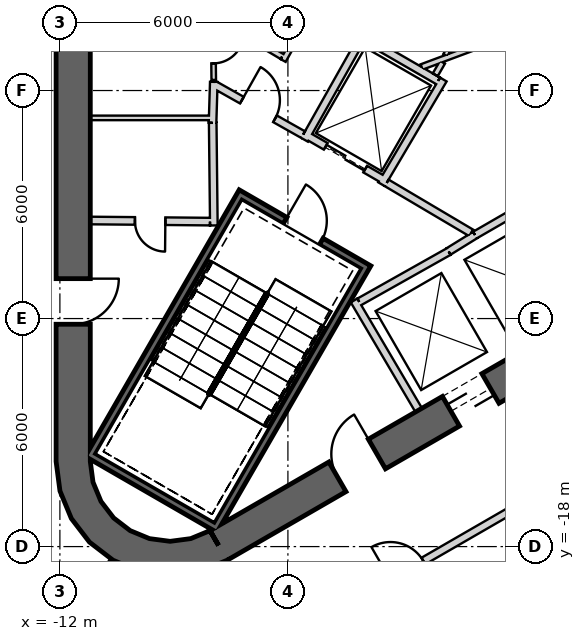
"""IFC4 building model, lengths in metres.
Left out: names, types, materials, properties, quantities, classifications, styles, units other than length and angle.
Written with IfcOpenShell. Run it as: python <this file> out.ifc"""

import sys

from ifc_helpers import new_model, si_unit, direction, frame, frame_2d, origin, place, context, subcontext, project, spatial, polyline, rectangle, outline, extrude, element, fill, save


model = new_model("IFC4")
c1 = context("Model", 3, precision=1e-05, world=origin(), true_north=direction((0.0, 1.0)))
c2 = subcontext(c1, "Body", "Model", "MODEL_VIEW")
j1 = project(units=[si_unit("LENGTHUNIT", "METRE"), si_unit("PLANEANGLEUNIT", "RADIAN")], contexts=[c1])
p1 = place(None, origin())
s1 = spatial("IfcSite", under=j1, at=p1, CompositionType="ELEMENT")
p2 = place(p1, origin())
s2 = spatial("IfcBuilding", under=s1, at=p2, CompositionType="ELEMENT")
p3 = place(p2, frame((0.0, 0.0, 404.8)))
s3 = spatial("IfcBuildingStorey", under=s2, at=p3, CompositionType="ELEMENT", Elevation=404.8)
p4 = place(p3, frame((-11.65, 15.762, 0.0), z_axis=(0.0, 0.0, 1.0), x_axis=(0.0, -1.0, 0.0)))
e1 = element("IfcWall", 1, at=p4, inside=s3, PredefinedType="SHEAR", context=c2, shape_type="SweptSolid", body=[
    extrude(rectangle(XDim=31.523, YDim=0.9, at=frame_2d((15.762, 0.0))), origin(), (0.0, 0.0, 1.0), 5.5),
])
p5 = place(p4, frame((3.612, 0.0, 0.0)))
e2 = element("IfcOpeningElement", 2, at=p5, cuts=e1, PredefinedType="OPENING", context=c2, shape_type="SweptSolid", body=[
    extrude(rectangle(XDim=1.2, YDim=2.4, at=frame_2d((0.6, 1.2))), frame((0.0, 0.46, 0.0), z_axis=(0.0, -1.0, 0.0), x_axis=(1.0, 0.0, 0.0)), (0.0, 0.0, 1.0), 0.92),
])
p6 = place(p4, frame((26.712, 0.0, 0.0)))
e3 = element("IfcOpeningElement", 3, at=p6, cuts=e1, PredefinedType="OPENING", context=c2, shape_type="SweptSolid", body=[
    extrude(rectangle(XDim=1.2, YDim=2.4, at=frame_2d((0.6, 1.2))), frame((0.0, 0.46, 0.0), z_axis=(0.0, -1.0, 0.0), x_axis=(1.0, 0.0, 0.0)), (0.0, 0.0, 1.0), 0.92),
])
p7 = place(p3, frame((-7.825, -17.97, 0.0), z_axis=(0.0, 0.0, 1.0), x_axis=(0.866028369851, 0.499994862586, 0.0)))
e4 = element("IfcWall", 4, at=p7, inside=s3, PredefinedType="SHEAR", context=c2, shape_type="SweptSolid", body=[
    extrude(rectangle(XDim=31.523, YDim=0.9, at=frame_2d((15.762, 0.0))), origin(), (0.0, 0.0, 1.0), 5.5),
])
p8 = place(p7, frame((7.062, 0.0, 0.0)))
e5 = element("IfcOpeningElement", 5, at=p8, cuts=e4, PredefinedType="OPENING", context=c2, shape_type="SweptSolid", body=[
    extrude(rectangle(XDim=1.2, YDim=2.4, at=frame_2d((0.6, 1.2))), frame((0.0, 0.46, 0.0), z_axis=(0.0, -1.0, 0.0), x_axis=(1.0, 0.0, 0.0)), (0.0, 0.0, 1.0), 0.92),
])
p9 = place(p7, frame((9.762, 0.0, 0.0)))
e6 = element("IfcOpeningElement", 6, at=p9, cuts=e4, PredefinedType="OPENING", context=c2, shape_type="SweptSolid", body=[
    extrude(rectangle(XDim=1.2, YDim=2.4, at=frame_2d((0.6, 1.2))), frame((0.0, 0.46, 0.0), z_axis=(0.0, -1.0, 0.0), x_axis=(1.0, 0.0, 0.0)), (0.0, 0.0, 1.0), 0.92),
])
p10 = place(p7, frame((17.862, 0.0, 0.0)))
e7 = element("IfcOpeningElement", 7, at=p10, cuts=e4, PredefinedType="OPENING", context=c2, shape_type="SweptSolid", body=[
    extrude(rectangle(XDim=1.2, YDim=2.4, at=frame_2d((0.6, 1.2))), frame((0.0, 0.46, 0.0), z_axis=(0.0, -1.0, 0.0), x_axis=(1.0, 0.0, 0.0)), (0.0, 0.0, 1.0), 0.92),
])
p11 = place(p7, frame((20.562, 0.0, 0.0)))
e8 = element("IfcOpeningElement", 8, at=p11, cuts=e4, PredefinedType="OPENING", context=c2, shape_type="SweptSolid", body=[
    extrude(rectangle(XDim=1.2, YDim=2.4, at=frame_2d((0.6, 1.2))), frame((0.0, 0.46, 0.0), z_axis=(0.0, -1.0, 0.0), x_axis=(1.0, 0.0, 0.0)), (0.0, 0.0, 1.0), 0.92),
])
p12 = place(p7, frame((26.712, 0.0, 0.0)))
e9 = element("IfcOpeningElement", 9, at=p12, cuts=e4, PredefinedType="OPENING", context=c2, shape_type="SweptSolid", body=[
    extrude(rectangle(XDim=1.2, YDim=2.4, at=frame_2d((0.6, 1.2))), frame((0.0, 0.46, 0.0), z_axis=(0.0, -1.0, 0.0), x_axis=(1.0, 0.0, 0.0)), (0.0, 0.0, 1.0), 0.92),
])
p13 = place(p7, frame((3.612, 0.0, 0.0)))
e10 = element("IfcOpeningElement", 10, at=p13, cuts=e4, PredefinedType="OPENING", context=c2, shape_type="SweptSolid", body=[
    extrude(rectangle(XDim=1.2, YDim=2.4, at=frame_2d((0.6, 1.2))), frame((0.0, 0.46, 0.0), z_axis=(0.0, -1.0, 0.0), x_axis=(1.0, 0.0, 0.0)), (0.0, 0.0, 1.0), 0.92),
])
p14 = place(p3, origin())
e11 = element("IfcWall", 11, at=p14, inside=s3, PredefinedType="SHEAR", context=c2, shape_type="SweptSolid", body=[
    extrude(outline(polyline([(-12.1, -15.762), (-11.998, -16.538), (-11.698, -17.262), (-11.221, -17.883), (-10.6, -18.36), (-9.876, -18.659), (-9.1, -18.762), (-8.323, -18.659), (-7.6, -18.36), (-8.05, -17.58), (-8.556, -17.79), (-9.1, -17.862), (-9.644, -17.79), (-10.15, -17.58), (-10.585, -17.247), (-10.919, -16.812), (-11.128, -16.305), (-11.2, -15.762), (-12.1, -15.762)])), origin(), (0.0, 0.0, 1.0), 5.5),
])
p15 = place(p3, frame((-2.558, -14.409, 0.0), z_axis=(0.0, 0.0, 1.0), x_axis=(-0.507997497166, 0.861358544901, 0.0)))
e12 = element("IfcWall", 12, at=p15, inside=s3, PredefinedType="PLUMBINGWALL", context=c2, shape_type="SweptSolid", body=[
    extrude(rectangle(XDim=3.35, YDim=0.2, at=frame_2d((1.675, 0.0))), origin(), (0.0, 0.0, 1.0), 5.25),
])
p16 = place(p3, frame((-1.769, -10.237, 0.0), z_axis=(0.0, 0.0, 1.0), x_axis=(-0.871534483978, -0.490334215854, 0.0)))
e13 = element("IfcWall", 13, at=p16, inside=s3, PredefinedType="PLUMBINGWALL", context=c2, shape_type="SweptSolid", body=[
    extrude(rectangle(XDim=2.7, YDim=0.2, at=frame_2d((1.35, 0.0))), origin(), (0.0, 0.0, 1.0), 5.25),
])
p17 = place(p3, frame((-1.076, -9.803, 0.0), z_axis=(0.0, 0.0, 1.0), x_axis=(-0.850341601995, -0.526231089842, 0.0)))
e14 = element("IfcWall", 14, at=p17, inside=s3, PredefinedType="PLUMBINGWALL", context=c2, shape_type="SweptSolid", body=[
    extrude(rectangle(XDim=0.817, YDim=0.2, at=frame_2d((0.408, 0.0))), origin(), (0.0, 0.0, 1.0), 5.25),
])
p18 = place(p3, frame((-1.077, -9.802, 0.0), z_axis=(0.0, 0.0, 1.0), x_axis=(0.865993522811, 0.500055215401, 0.0)))
e15 = element("IfcWall", 15, at=p18, inside=s3, PredefinedType="PLUMBINGWALL", context=c2, shape_type="SweptSolid", body=[
    extrude(rectangle(XDim=1.884, YDim=0.2, at=frame_2d((0.942, 0.0))), origin(), (0.0, 0.0, 1.0), 5.25),
])
p19 = place(p3, frame((-3.905, -10.563, -0.3), z_axis=(0.0, 0.0, 1.0), x_axis=(-0.500012932018, -0.866017937352, 0.0)))
e16 = element("IfcWall", 16, at=p19, inside=s3, PredefinedType="SHEAR", context=c2, shape_type="SweptSolid", body=[
    extrude(rectangle(XDim=8.1, YDim=0.2, at=frame_2d((4.05, 0.0))), origin(), (0.0, 0.0, 1.0), 5.55),
])
p20 = place(p3, frame((-11.282, -15.541, -0.3), z_axis=(0.0, 0.0, 1.0), x_axis=(0.866000483506, -0.500043160704, 0.0)))
e17 = element("IfcWall", 17, at=p20, inside=s3, PredefinedType="SHEAR", context=c2, shape_type="SweptSolid", body=[
    extrude(rectangle(XDim=3.8, YDim=0.2, at=frame_2d((1.9, 0.0))), origin(), (0.0, 0.0, 1.0), 5.55),
])
p21 = place(p3, frame((-7.196, -8.663, -0.3), z_axis=(0.0, 0.0, 1.0), x_axis=(-0.499997992926, -0.866026562566, 0.0)))
e18 = element("IfcWall", 18, at=p21, inside=s3, PredefinedType="SHEAR", context=c2, shape_type="SweptSolid", body=[
    extrude(rectangle(XDim=7.9, YDim=0.2, at=frame_2d((3.95, 0.0))), origin(), (0.0, 0.0, 1.0), 5.55),
])
p22 = place(p3, frame((-4.041, -10.599, -0.3), z_axis=(0.0, 0.0, 1.0), x_axis=(-0.866047807691, 0.499961193289, 0.0)))
e19 = element("IfcWall", 19, at=p22, inside=s3, PredefinedType="SHEAR", context=c2, shape_type="SweptSolid", body=[
    extrude(rectangle(XDim=3.6, YDim=0.2, at=frame_2d((1.8, 0.0))), origin(), (0.0, 0.0, 1.0), 5.55),
])
p23 = place(p22, frame((1.25, 0.0, 0.3)))
e20 = element("IfcOpeningElement", 20, at=p23, cuts=e19, PredefinedType="OPENING", context=c2, shape_type="SweptSolid", body=[
    extrude(rectangle(XDim=1.1, YDim=2.1, at=frame_2d((0.55, 1.05))), frame((0.0, 0.11, 0.0), z_axis=(0.0, -1.0, 0.0), x_axis=(1.0, 0.0, 0.0)), (0.0, 0.0, 1.0), 0.22),
])
p24 = place(p3, frame((-3.446, -8.368, 0.0), z_axis=(0.0, 0.0, 1.0), x_axis=(-0.866024647952, 0.500001309137, 0.0)))
e21 = element("IfcWall", 21, at=p24, inside=s3, PredefinedType="PLUMBINGWALL", context=c2, shape_type="SweptSolid", body=[
    extrude(rectangle(XDim=2.4, YDim=0.2, at=frame_2d((1.2, 0.0))), origin(), (0.0, 0.0, 1.0), 5.25),
])
p25 = place(p24, frame((0.6, 0.0, 0.0)))
e22 = element("IfcOpeningElement", 22, at=p25, cuts=e21, PredefinedType="OPENING", context=c2, shape_type="SweptSolid", body=[
    extrude(rectangle(XDim=1.2, YDim=2.4, at=frame_2d((0.6, 1.2))), frame((0.0, 0.11, 0.0), z_axis=(0.0, -1.0, 0.0), x_axis=(1.0, 0.0, 0.0)), (0.0, 0.0, 1.0), 0.22),
])
p26 = place(p3, frame((-3.953, -4.646, 0.0), z_axis=(0.0, 0.0, 1.0), x_axis=(0.86605622881, -0.499946605688, 0.0)))
e23 = element("IfcWall", 23, at=p26, inside=s3, PredefinedType="PLUMBINGWALL", context=c2, shape_type="SweptSolid", body=[
    extrude(rectangle(XDim=2.2, YDim=0.2, at=frame_2d((1.1, 0.0))), origin(), (0.0, 0.0, 1.0), 5.25),
])
p27 = place(p3, frame((-1.91, -5.71, 0.0), z_axis=(0.0, 0.0, 1.0), x_axis=(-0.508616218331, -0.860993346345, 0.0)))
e24 = element("IfcWall", 24, at=p27, inside=s3, PredefinedType="PLUMBINGWALL", context=c2, shape_type="SweptSolid", body=[
    extrude(rectangle(XDim=3.2, YDim=0.2, at=frame_2d((1.6, 0.0))), origin(), (0.0, 0.0, 1.0), 5.25),
])
p28 = place(p3, frame((-3.99, -4.509, 0.0), z_axis=(0.0, 0.0, 1.0), x_axis=(-0.491358283181, -0.870957540612, 0.0)))
e25 = element("IfcWall", 25, at=p28, inside=s3, PredefinedType="PLUMBINGWALL", context=c2, shape_type="SweptSolid", body=[
    extrude(rectangle(XDim=3.2, YDim=0.2, at=frame_2d((1.6, 0.0))), origin(), (0.0, 0.0, 1.0), 5.25),
])
p29 = place(p3, frame((-11.2, -6.72, 0.0), z_axis=(0.0, 0.0, 1.0), x_axis=(1.0, 0.0, 0.0)))
e26 = element("IfcWall", 26, at=p29, inside=s3, PredefinedType="PARTITIONING", context=c2, shape_type="SweptSolid", body=[
    extrude(rectangle(XDim=3.25, YDim=0.12, at=frame_2d((1.625, 0.0))), origin(), (0.0, 0.0, 1.0), 5.25),
])
p30 = place(p3, frame((-7.983, -6.85, 0.0), z_axis=(0.0, 0.0, 1.0), x_axis=(0.030803413295, 0.999525462272, 0.0)))
e27 = element("IfcWall", 27, at=p30, inside=s3, PredefinedType="PARTITIONING", context=c2, shape_type="SweptSolid", body=[
    extrude(rectangle(XDim=1.078, YDim=0.2, at=frame_2d((0.539, 0.0))), origin(), (0.0, 0.0, 1.0), 5.25),
])
p31 = place(p3, frame((-7.951, -5.721, 0.0), z_axis=(0.0, 0.0, 1.0), x_axis=(-0.011976938133, 0.999928273904, 0.0)))
e28 = element("IfcWall", 28, at=p31, inside=s3, PredefinedType="PARTITIONING", context=c2, shape_type="SweptSolid", body=[
    extrude(rectangle(XDim=1.671, YDim=0.12, at=frame_2d((0.836, 0.0))), origin(), (0.0, 0.0, 1.0), 5.25),
])
p32 = place(p31, frame((0.436, 0.0, 0.0)))
e29 = element("IfcOpeningElement", 29, at=p32, cuts=e28, PredefinedType="OPENING", context=c2, shape_type="SweptSolid", body=[
    extrude(rectangle(XDim=0.8, YDim=2.1, at=frame_2d((0.4, 1.05))), frame((0.0, 0.07, 0.0), z_axis=(0.0, -1.0, 0.0), x_axis=(1.0, 0.0, 0.0)), (0.0, 0.0, 1.0), 0.14),
])
p33 = place(p3, frame((-7.949, -9.55, 0.0), z_axis=(0.0, 0.0, 1.0), x_axis=(-0.011121475088, 0.999938154483, 0.0)))
e30 = element("IfcWall", 30, at=p33, inside=s3, PredefinedType="PARTITIONING", context=c2, shape_type="SweptSolid", body=[
    extrude(rectangle(XDim=2.7, YDim=0.2, at=frame_2d((1.35, 0.0))), origin(), (0.0, 0.0, 1.0), 5.25),
])
p34 = place(p3, frame((-11.2, -9.42, 0.0), z_axis=(0.0, 0.0, 1.0), x_axis=(0.999957467379, -0.009222983926, 0.0)))
e31 = element("IfcWall", 31, at=p34, inside=s3, PredefinedType="PARTITIONING", context=c2, shape_type="SweptSolid", body=[
    extrude(rectangle(XDim=3.15, YDim=0.2, at=frame_2d((1.575, 0.0))), origin(), (0.0, 0.0, 1.0), 5.25),
])
p35 = place(p34, frame((1.175, 0.0, 0.0)))
e32 = element("IfcOpeningElement", 32, at=p35, cuts=e31, PredefinedType="OPENING", context=c2, shape_type="SweptSolid", body=[
    extrude(rectangle(XDim=0.8, YDim=2.1, at=frame_2d((0.4, 1.05))), frame((0.0, 0.11, 0.0), z_axis=(0.0, -1.0, 0.0), x_axis=(1.0, 0.0, 0.0)), (0.0, 0.0, 1.0), 0.22),
])
p36 = place(p3, frame((-3.401, -8.43, 0.0), z_axis=(0.0, 0.0, 1.0), x_axis=(0.860630814782, -0.509229418482, 0.0)))
e33 = element("IfcWall", 33, at=p36, inside=s3, PredefinedType="PARTITIONING", context=c2, shape_type="SweptSolid", body=[
    extrude(rectangle(XDim=2.582, YDim=0.2, at=frame_2d((1.291, 0.0))), origin(), (0.0, 0.0, 1.0), 5.25),
])
p37 = place(p3, frame((-7.96, -5.831, 0.0), z_axis=(0.0, 0.0, 1.0), x_axis=(0.871327438366, -0.490702043148, 0.0)))
e34 = element("IfcWall", 34, at=p37, inside=s3, PredefinedType="PARTITIONING", context=c2, shape_type="SweptSolid", body=[
    extrude(rectangle(XDim=2.708, YDim=0.2, at=frame_2d((1.354, 0.0))), origin(), (0.0, 0.0, 1.0), 5.25),
])
p38 = place(p37, frame((0.86, 0.0, 0.0)))
e35 = element("IfcOpeningElement", 35, at=p38, cuts=e34, PredefinedType="OPENING", context=c2, shape_type="SweptSolid", body=[
    extrude(rectangle(XDim=1.0, YDim=2.1, at=frame_2d((0.5, 1.05))), frame((0.0, 0.11, 0.0), z_axis=(0.0, -1.0, 0.0), x_axis=(1.0, 0.0, 0.0)), (0.0, 0.0, 1.0), 0.22),
])
p39 = place(p3, frame((4.807, -2.659, 0.0), z_axis=(0.0, 0.0, 1.0), x_axis=(-0.936818342118, -0.349816228714, 0.0)))
e36 = element("IfcWall", 36, at=p39, inside=s3, PredefinedType="PLUMBINGWALL", context=c2, shape_type="SweptSolid", body=[
    extrude(rectangle(XDim=7.78, YDim=0.15, at=frame_2d((3.89, 0.0))), origin(), (0.0, 0.0, 1.0), 5.25),
])
p40 = place(p3, frame((0.182, -1.535, 0.0), z_axis=(0.0, 0.0, 1.0), x_axis=(-0.499988401207, -0.866032100247, 0.0)))
e37 = element("IfcWall", 37, at=p40, inside=s3, PredefinedType="PARTITIONING", context=c2, shape_type="SweptSolid", body=[
    extrude(rectangle(XDim=4.079, YDim=0.12, at=frame_2d((2.04, 0.0))), origin(), (0.0, 0.0, 1.0), 5.25),
])
p41 = place(p40, frame((1.691, 0.0, 0.0)))
e38 = element("IfcOpeningElement", 38, at=p41, cuts=e37, PredefinedType="OPENING", context=c2, shape_type="SweptSolid", body=[
    extrude(rectangle(XDim=0.8, YDim=2.1, at=frame_2d((0.4, 1.05))), frame((0.0, 0.07, 0.0), z_axis=(0.0, -1.0, 0.0), x_axis=(1.0, 0.0, 0.0)), (0.0, 0.0, 1.0), 0.14),
])
p42 = place(p3, frame((-1.932, -5.256, 0.0), z_axis=(0.0, 0.0, 1.0), x_axis=(-0.499777709171, -0.866153705422, 0.0)))
e39 = element("IfcWall", 39, at=p42, inside=s3, PredefinedType="PLUMBINGWALL", context=c2, shape_type="SweptSolid", body=[
    extrude(rectangle(XDim=0.383, YDim=0.15, at=frame_2d((0.191, 0.0))), origin(), (0.0, 0.0, 1.0), 5.25),
])
p43 = place(p3, frame((-6.125, -5.211, 0.0), z_axis=(0.0, 0.0, 1.0), x_axis=(0.488762436737, 0.87241691893, 0.0)))
e40 = element("IfcWall", 40, at=p43, inside=s3, PredefinedType="PLUMBINGWALL", context=c2, shape_type="SweptSolid", body=[
    extrude(rectangle(XDim=2.337, YDim=0.15, at=frame_2d((1.168, 0.0))), origin(), (0.0, 0.0, 1.0), 5.25),
])
p44 = place(p43, frame((0.806, 0.0, 0.0)))
e41 = element("IfcOpeningElement", 41, at=p44, cuts=e40, PredefinedType="OPENING", context=c2, shape_type="SweptSolid", body=[
    extrude(rectangle(XDim=0.8, YDim=2.1, at=frame_2d((0.4, 1.05))), frame((0.0, 0.085, 0.0), z_axis=(0.0, -1.0, 0.0), x_axis=(1.0, 0.0, 0.0)), (0.0, 0.0, 1.0), 0.17),
])
p45 = place(p3, frame((-7.95, -4.041, 0.0), z_axis=(0.0, 0.0, 1.0), x_axis=(0.860090281069, -0.510141851263, 0.0)))
e42 = element("IfcWall", 42, at=p45, inside=s3, PredefinedType="PLUMBINGWALL", context=c2, shape_type="SweptSolid", body=[
    extrude(rectangle(XDim=2.089, YDim=0.15, at=frame_2d((1.045, 0.0))), origin(), (0.0, 0.0, 1.0), 5.25),
])
p46 = place(p3, frame((-10.549, -18.212, 0.0), z_axis=(0.0, 0.0, 1.0), x_axis=(-0.500047596559, -0.865997922154, 0.0)))
e43 = element("IfcWall", 43, at=p46, inside=s3, PredefinedType="PARTITIONING", context=c2, shape_type="SweptSolid", body=[
    extrude(rectangle(XDim=2.6, YDim=0.12, at=frame_2d((1.3, 0.0))), origin(), (0.0, 0.0, 1.0), 3.02),
])
p47 = place(p3, frame((-6.852, -20.93, 0.0), z_axis=(0.0, 0.0, 1.0), x_axis=(0.866016739626, 0.500015006463, 0.0)))
e44 = element("IfcWall", 44, at=p47, inside=s3, PredefinedType="PARTITIONING", context=c2, shape_type="SweptSolid", body=[
    extrude(rectangle(XDim=9.078, YDim=0.2, at=frame_2d((4.539, 0.0))), origin(), (0.0, 0.0, 1.0), 5.25),
])
p48 = place(p47, frame((4.1, 0.0, 0.0)))
e45 = element("IfcOpeningElement", 45, at=p48, cuts=e44, PredefinedType="OPENING", context=c2, shape_type="SweptSolid", body=[
    extrude(rectangle(XDim=1.0, YDim=2.1, at=frame_2d((0.5, 1.05))), frame((0.0, 0.11, 0.0), z_axis=(0.0, -1.0, 0.0), x_axis=(1.0, 0.0, 0.0)), (0.0, 0.0, 1.0), 0.22),
])
p49 = place(p23, origin())
e46 = element("IfcDoor", 46, at=p49, inside=s3, OperationType="SINGLE_SWING_RIGHT", PredefinedType="USERDEFINED", context=c2, shape_type="SweptSolid", body=[
    extrude(rectangle(XDim=1.1, YDim=2.1, at=frame_2d((0.55, 1.05))), frame((0.0, 0.025, 0.0), z_axis=(0.0, -1.0, 0.0), x_axis=(1.0, 0.0, 0.0)), (0.0, 0.0, 1.0), 0.05),
])
fill(e20, e46)
p50 = place(p38, origin())
e47 = element("IfcDoor", 47, at=p50, inside=s3, OperationType="SINGLE_SWING_LEFT", PredefinedType="USERDEFINED", context=c2, shape_type="SweptSolid", body=[
    extrude(rectangle(XDim=1.0, YDim=2.1, at=frame_2d((0.5, 1.05))), frame((0.0, 0.025, 0.0), z_axis=(0.0, -1.0, 0.0), x_axis=(1.0, 0.0, 0.0)), (0.0, 0.0, 1.0), 0.05),
])
fill(e35, e47)
p51 = place(p25, origin())
e48 = element("IfcDoor", 48, at=p51, inside=s3, OperationType="SLIDING_TO_LEFT", PredefinedType="USERDEFINED", context=c2, shape_type="SweptSolid", body=[
    extrude(rectangle(XDim=1.2, YDim=2.4, at=frame_2d((0.6, 1.2))), frame((0.0, 0.025, 0.0), z_axis=(0.0, -1.0, 0.0), x_axis=(1.0, 0.0, 0.0)), (0.0, 0.0, 1.0), 0.05),
])
fill(e22, e48)
p52 = place(p32, origin())
e49 = element("IfcDoor", 49, at=p52, inside=s3, OperationType="SINGLE_SWING_RIGHT", PredefinedType="USERDEFINED", context=c2, shape_type="SweptSolid", body=[
    extrude(rectangle(XDim=0.8, YDim=2.1, at=frame_2d((0.4, 1.05))), frame((0.0, 0.025, 0.0), z_axis=(0.0, -1.0, 0.0), x_axis=(1.0, 0.0, 0.0)), (0.0, 0.0, 1.0), 0.05),
])
fill(e29, e49)
p53 = place(p35, origin())
e50 = element("IfcDoor", 50, at=p53, inside=s3, OperationType="SINGLE_SWING_RIGHT", PredefinedType="USERDEFINED", context=c2, shape_type="SweptSolid", body=[
    extrude(rectangle(XDim=0.8, YDim=2.1, at=frame_2d((0.4, 1.05))), frame((0.0, 0.025, 0.0), z_axis=(0.0, -1.0, 0.0), x_axis=(1.0, 0.0, 0.0)), (0.0, 0.0, 1.0), 0.05),
])
fill(e32, e50)
p54 = place(p48, origin())
e51 = element("IfcDoor", 51, at=p54, inside=s3, OperationType="SINGLE_SWING_LEFT", PredefinedType="USERDEFINED", context=c2, shape_type="SweptSolid", body=[
    extrude(rectangle(XDim=1.0, YDim=2.1, at=frame_2d((0.5, 1.05))), frame((0.0, 0.025, 0.0), z_axis=(0.0, -1.0, 0.0), x_axis=(1.0, 0.0, 0.0)), (0.0, 0.0, 1.0), 0.05),
])
fill(e45, e51)
p55 = place(p8, origin())
e52 = element("IfcDoor", 52, at=p55, inside=s3, OperationType="SLIDING_TO_LEFT", PredefinedType="USERDEFINED", context=c2, shape_type="SweptSolid", body=[
    extrude(rectangle(XDim=1.2, YDim=2.4, at=frame_2d((0.6, 1.2))), frame((0.0, 0.025, 0.0), z_axis=(0.0, -1.0, 0.0), x_axis=(1.0, 0.0, 0.0)), (0.0, 0.0, 1.0), 0.05),
])
fill(e5, e52)
p56 = place(p6, origin())
e53 = element("IfcDoor", 53, at=p56, inside=s3, OperationType="SINGLE_SWING_LEFT", PredefinedType="USERDEFINED", context=c2, shape_type="SweptSolid", body=[
    extrude(rectangle(XDim=1.2, YDim=2.4, at=frame_2d((0.6, 1.2))), frame((0.0, 0.025, 0.0), z_axis=(0.0, -1.0, 0.0), x_axis=(1.0, 0.0, 0.0)), (0.0, 0.0, 1.0), 0.05),
])
fill(e3, e53)
p57 = place(p13, origin())
e54 = element("IfcDoor", 54, at=p57, inside=s3, OperationType="SINGLE_SWING_RIGHT", PredefinedType="USERDEFINED", context=c2, shape_type="SweptSolid", body=[
    extrude(rectangle(XDim=1.2, YDim=2.4, at=frame_2d((0.6, 1.2))), frame((0.0, 0.025, 0.0), z_axis=(0.0, -1.0, 0.0), x_axis=(1.0, 0.0, 0.0)), (0.0, 0.0, 1.0), 0.05),
])
fill(e10, e54)
save(model, sys.argv[1])
